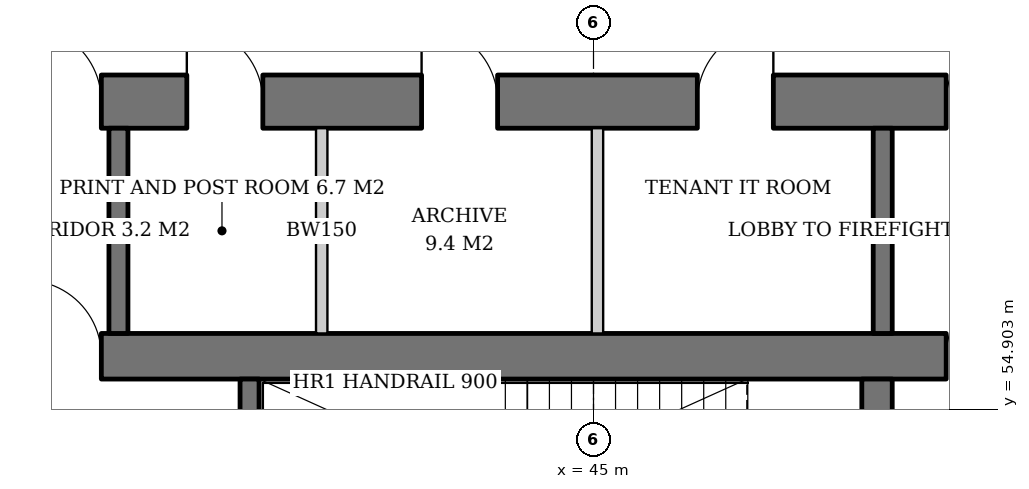
"""IFC4 building model, lengths in metres.
Left out: names, types, materials, properties, quantities, classifications, styles, units other than length and angle.
Written with IfcOpenShell. Run it as: python <this file> out.ifc"""

import sys

from ifc_helpers import new_model, si_unit, direction, frame, frame_2d, origin, place, context, subcontext, project, spatial, rectangle, extrude, element, fill, save


model = new_model("IFC4")
c1 = context("Model", 3, precision=1e-05, world=origin(), true_north=direction((0.0, 1.0)))
c2 = subcontext(c1, "Body", "Model", "MODEL_VIEW")
j1 = project(units=[si_unit("LENGTHUNIT", "METRE"), si_unit("PLANEANGLEUNIT", "RADIAN")], contexts=[c1])
p1 = place(None, origin())
s1 = spatial("IfcSite", under=j1, at=p1, CompositionType="ELEMENT")
p2 = place(p1, origin())
s2 = spatial("IfcBuilding", under=s1, at=p2, CompositionType="ELEMENT")
p3 = place(p2, frame((0.0, 0.0, 154.0)))
s3 = spatial("IfcBuildingStorey", under=s2, at=p3, CompositionType="ELEMENT", Elevation=154.0)
p4 = place(p3, frame((35.1, 55.6, 0.0), z_axis=(0.0, 0.0, 1.0), x_axis=(1.0, 0.0, 0.0)))
e1 = element("IfcWall", 1, at=p4, inside=s3, PredefinedType="SHEAR", context=c2, shape_type="SweptSolid", body=[
    extrude(rectangle(XDim=19.8, YDim=0.6, at=frame_2d((9.9, 0.0))), origin(), (0.0, 0.0, 1.0), 3.8),
])
p5 = place(p4, frame((14.54, 0.0, 0.0)))
e2 = element("IfcOpeningElement", 2, at=p5, cuts=e1, PredefinedType="OPENING", context=c2, shape_type="SweptSolid", body=[
    extrude(rectangle(XDim=1.0, YDim=2.1, at=frame_2d((0.5, 1.05))), frame((0.0, 0.31, 0.0), z_axis=(0.0, -1.0, 0.0), x_axis=(1.0, 0.0, 0.0)), (0.0, 0.0, 1.0), 0.62),
])
p6 = place(p4, frame((2.425, 0.0, 0.0)))
e3 = element("IfcOpeningElement", 3, at=p6, cuts=e1, PredefinedType="OPENING", context=c2, shape_type="SweptSolid", body=[
    extrude(rectangle(XDim=1.0, YDim=2.1, at=frame_2d((0.5, 1.05))), frame((0.0, 0.31, 0.0), z_axis=(0.0, -1.0, 0.0), x_axis=(1.0, 0.0, 0.0)), (0.0, 0.0, 1.0), 0.62),
])
p7 = place(p3, frame((31.7, 58.95, 0.0), z_axis=(0.0, 0.0, 1.0), x_axis=(1.0, 0.0, 0.0)))
e4 = element("IfcWall", 4, at=p7, inside=s3, PredefinedType="SHEAR", context=c2, shape_type="SweptSolid", body=[
    extrude(rectangle(XDim=26.6, YDim=0.7, at=frame_2d((13.3, 0.0))), origin(), (0.0, 0.0, 1.0), 3.8),
])
p8 = place(p7, frame((17.94, 0.0, 0.0)))
e5 = element("IfcOpeningElement", 5, at=p8, cuts=e4, PredefinedType="OPENING", context=c2, shape_type="SweptSolid", body=[
    extrude(rectangle(XDim=1.0, YDim=2.1, at=frame_2d((0.5, 1.05))), frame((0.0, 0.36, 0.0), z_axis=(0.0, -1.0, 0.0), x_axis=(1.0, 0.0, 0.0)), (0.0, 0.0, 1.0), 0.72),
])
p9 = place(p7, frame((5.825, 0.0, 0.0)))
e6 = element("IfcOpeningElement", 6, at=p9, cuts=e4, PredefinedType="OPENING", context=c2, shape_type="SweptSolid", body=[
    extrude(rectangle(XDim=1.0, YDim=2.1, at=frame_2d((0.5, 1.05))), frame((0.0, 0.36, 0.0), z_axis=(0.0, -1.0, 0.0), x_axis=(1.0, 0.0, 0.0)), (0.0, 0.0, 1.0), 0.72),
])
p10 = place(p7, frame((1.837, 0.0, 0.0)))
e7 = element("IfcOpeningElement", 7, at=p10, cuts=e4, PredefinedType="OPENING", context=c2, shape_type="SweptSolid", body=[
    extrude(rectangle(XDim=1.0, YDim=2.1, at=frame_2d((0.5, 1.05))), frame((0.0, 0.36, 0.0), z_axis=(0.0, -1.0, 0.0), x_axis=(1.0, 0.0, 0.0)), (0.0, 0.0, 1.0), 0.72),
])
p11 = place(p7, frame((3.781, 0.0, 0.0)))
e8 = element("IfcOpeningElement", 8, at=p11, cuts=e4, PredefinedType="OPENING", context=c2, shape_type="SweptSolid", body=[
    extrude(rectangle(XDim=1.0, YDim=2.1, at=frame_2d((0.5, 1.05))), frame((0.0, 0.36, 0.0), z_axis=(0.0, -1.0, 0.0), x_axis=(1.0, 0.0, 0.0)), (0.0, 0.0, 1.0), 0.72),
])
p12 = place(p7, frame((7.95, 0.0, 0.0)))
e9 = element("IfcOpeningElement", 9, at=p12, cuts=e4, PredefinedType="OPENING", context=c2, shape_type="SweptSolid", body=[
    extrude(rectangle(XDim=1.0, YDim=2.1, at=frame_2d((0.5, 1.05))), frame((0.0, 0.36, 0.0), z_axis=(0.0, -1.0, 0.0), x_axis=(1.0, 0.0, 0.0)), (0.0, 0.0, 1.0), 0.72),
])
p13 = place(p7, frame((11.038, 0.0, 0.0)))
e10 = element("IfcOpeningElement", 10, at=p13, cuts=e4, PredefinedType="OPENING", context=c2, shape_type="SweptSolid", body=[
    extrude(rectangle(XDim=1.0, YDim=2.1, at=frame_2d((0.5, 1.05))), frame((0.0, 0.36, 0.0), z_axis=(0.0, -1.0, 0.0), x_axis=(1.0, 0.0, 0.0)), (0.0, 0.0, 1.0), 0.72),
])
p14 = place(p7, frame((14.666, 0.0, 0.0)))
e11 = element("IfcOpeningElement", 11, at=p14, cuts=e4, PredefinedType="OPENING", context=c2, shape_type="SweptSolid", body=[
    extrude(rectangle(XDim=1.0, YDim=2.1, at=frame_2d((0.5, 1.05))), frame((0.0, 0.36, 0.0), z_axis=(0.0, -1.0, 0.0), x_axis=(1.0, 0.0, 0.0)), (0.0, 0.0, 1.0), 0.72),
])
p15 = place(p7, frame((20.9, 0.0, 0.0)))
e12 = element("IfcOpeningElement", 12, at=p15, cuts=e4, PredefinedType="OPENING", context=c2, shape_type="SweptSolid", body=[
    extrude(rectangle(XDim=1.0, YDim=2.1, at=frame_2d((0.5, 1.05))), frame((0.0, 0.36, 0.0), z_axis=(0.0, -1.0, 0.0), x_axis=(1.0, 0.0, 0.0)), (0.0, 0.0, 1.0), 0.72),
])
p16 = place(p7, frame((23.75, 0.0, 0.0)))
e13 = element("IfcOpeningElement", 13, at=p16, cuts=e4, PredefinedType="OPENING", context=c2, shape_type="SweptSolid", body=[
    extrude(rectangle(XDim=1.0, YDim=2.1, at=frame_2d((0.5, 1.05))), frame((0.0, 0.36, 0.0), z_axis=(0.0, -1.0, 0.0), x_axis=(1.0, 0.0, 0.0)), (0.0, 0.0, 1.0), 0.72),
])
p17 = place(p3, frame((48.73, 52.4, 0.0), z_axis=(0.0, 0.0, 1.0), x_axis=(0.0, 1.0, 0.0)))
e14 = element("IfcWall", 14, at=p17, inside=s3, PredefinedType="SHEAR", context=c2, shape_type="SweptSolid", body=[
    extrude(rectangle(XDim=2.9, YDim=0.4, at=frame_2d((1.45, 0.0))), origin(), (0.0, 0.0, 1.0), 3.8),
])
p18 = place(p17, frame((0.3, 0.0, 0.0)))
e15 = element("IfcOpeningElement", 15, at=p18, cuts=e14, PredefinedType="OPENING", context=c2, shape_type="SweptSolid", body=[
    extrude(rectangle(XDim=1.0, YDim=2.1, at=frame_2d((0.5, 1.05))), frame((0.0, 0.21, 0.0), z_axis=(0.0, -1.0, 0.0), x_axis=(1.0, 0.0, 0.0)), (0.0, 0.0, 1.0), 0.42),
])
p19 = place(p3, frame((40.475, 52.4, 0.0), z_axis=(0.0, 0.0, 1.0), x_axis=(0.0, 1.0, 0.0)))
e16 = element("IfcWall", 16, at=p19, inside=s3, PredefinedType="SHEAR", context=c2, shape_type="SweptSolid", body=[
    extrude(rectangle(XDim=2.9, YDim=0.25, at=frame_2d((1.45, 0.0))), origin(), (0.0, 0.0, 1.0), 3.8),
])
for number, where, z_axis, x_axis in (
    (17, (48.805, 55.9, 0.0), (0.0, 0.0, 1.0), (0.0, 1.0, 0.0)),
    (18, (38.75, 55.9, 0.0), (0.0, 0.0, 1.0), (0.0, 1.0, 0.0)),
):
    element("IfcWall", number, at=place(p3, frame(where, z_axis=z_axis, x_axis=x_axis)), inside=s3, PredefinedType="SOLIDWALL", context=c2, shape_type="SweptSolid", body=[
        extrude(rectangle(XDim=2.7, YDim=0.25, at=frame_2d((1.35, 0.0))), origin(), (0.0, 0.0, 1.0), 3.52),
    ])
for number, where, z_axis, x_axis in (
    (19, (41.424, 55.9, 0.0), (0.0, 0.0, 1.0), (0.0, 1.0, 0.0)),
    (20, (45.052, 55.9, 0.0), (0.0, 0.0, 1.0), (0.0, 1.0, 0.0)),
):
    element("IfcWall", number, at=place(p3, frame(where, z_axis=z_axis, x_axis=x_axis)), inside=s3, PredefinedType="SOLIDWALL", context=c2, shape_type="SweptSolid", body=[
        extrude(rectangle(XDim=2.7, YDim=0.15, at=frame_2d((1.35, 0.0))), origin(), (0.0, 0.0, 1.0), 3.52),
    ])
p20 = place(p5, origin())
e21 = element("IfcDoor", 21, at=p20, inside=s3, OperationType="SINGLE_SWING_RIGHT", PredefinedType="DOOR", context=c2, shape_type="SweptSolid", body=[
    extrude(rectangle(XDim=1.0, YDim=2.1, at=frame_2d((0.5, 1.05))), frame((0.0, 0.025, 0.0), z_axis=(0.0, -1.0, 0.0), x_axis=(1.0, 0.0, 0.0)), (0.0, 0.0, 1.0), 0.05),
])
fill(e2, e21)
p21 = place(p8, origin())
e22 = element("IfcDoor", 22, at=p21, inside=s3, OperationType="SINGLE_SWING_RIGHT", PredefinedType="DOOR", context=c2, shape_type="SweptSolid", body=[
    extrude(rectangle(XDim=1.0, YDim=2.1, at=frame_2d((0.5, 1.05))), frame((0.0, 0.025, 0.0), z_axis=(0.0, -1.0, 0.0), x_axis=(1.0, 0.0, 0.0)), (0.0, 0.0, 1.0), 0.05),
])
fill(e5, e22)
p22 = place(p9, origin())
e23 = element("IfcDoor", 23, at=p22, inside=s3, OperationType="SINGLE_SWING_LEFT", PredefinedType="DOOR", context=c2, shape_type="SweptSolid", body=[
    extrude(rectangle(XDim=1.0, YDim=2.1, at=frame_2d((0.5, 1.05))), frame((0.0, 0.025, 0.0), z_axis=(0.0, -1.0, 0.0), x_axis=(1.0, 0.0, 0.0)), (0.0, 0.0, 1.0), 0.05),
])
fill(e6, e23)
p23 = place(p6, origin())
e24 = element("IfcDoor", 24, at=p23, inside=s3, OperationType="SINGLE_SWING_LEFT", PredefinedType="DOOR", context=c2, shape_type="SweptSolid", body=[
    extrude(rectangle(XDim=1.0, YDim=2.1, at=frame_2d((0.5, 1.05))), frame((0.0, -0.24, 0.0), z_axis=(0.0, -1.0, 0.0), x_axis=(1.0, 0.0, 0.0)), (0.0, 0.0, 1.0), 0.05),
])
fill(e3, e24)
p24 = place(p12, origin())
e25 = element("IfcDoor", 25, at=p24, inside=s3, OperationType="SINGLE_SWING_LEFT", PredefinedType="DOOR", context=c2, shape_type="SweptSolid", body=[
    extrude(rectangle(XDim=1.0, YDim=2.1, at=frame_2d((0.5, 1.05))), frame((0.0, -0.29, 0.0), z_axis=(0.0, -1.0, 0.0), x_axis=(1.0, 0.0, 0.0)), (0.0, 0.0, 1.0), 0.05),
])
fill(e9, e25)
p25 = place(p13, origin())
e26 = element("IfcDoor", 26, at=p25, inside=s3, OperationType="SINGLE_SWING_LEFT", PredefinedType="DOOR", context=c2, shape_type="SweptSolid", body=[
    extrude(rectangle(XDim=1.0, YDim=2.1, at=frame_2d((0.5, 1.05))), frame((0.0, -0.29, 0.0), z_axis=(0.0, -1.0, 0.0), x_axis=(1.0, 0.0, 0.0)), (0.0, 0.0, 1.0), 0.05),
])
fill(e10, e26)
p26 = place(p14, origin())
e27 = element("IfcDoor", 27, at=p26, inside=s3, OperationType="SINGLE_SWING_RIGHT", PredefinedType="DOOR", context=c2, shape_type="SweptSolid", body=[
    extrude(rectangle(XDim=1.0, YDim=2.1, at=frame_2d((0.5, 1.05))), frame((0.0, -0.29, 0.0), z_axis=(0.0, -1.0, 0.0), x_axis=(1.0, 0.0, 0.0)), (0.0, 0.0, 1.0), 0.05),
])
fill(e11, e27)
save(model, sys.argv[1])
